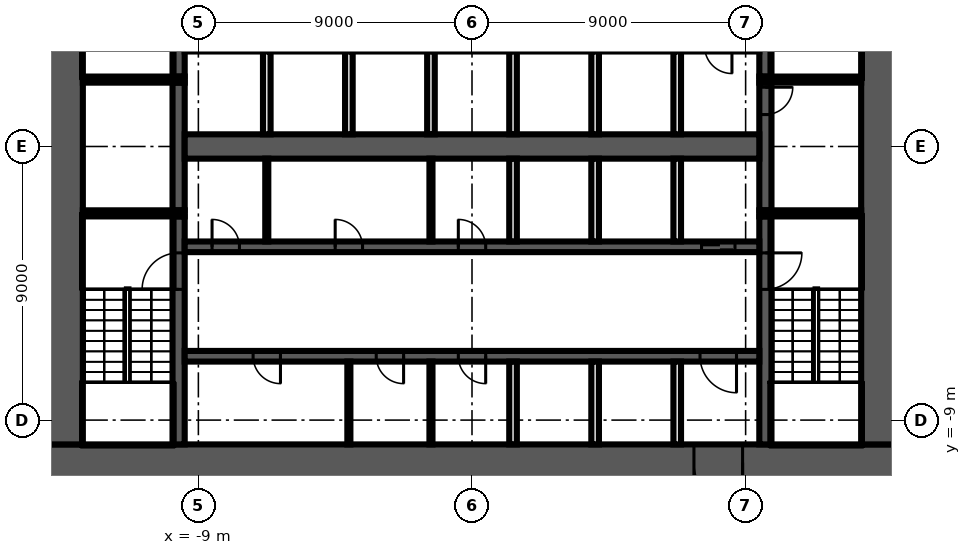
"""IFC4 building model, lengths in metres.
Left out: names, types, materials, properties, quantities, classifications, styles, units other than length and angle.
Written with IfcOpenShell. Run it as: python <this file> out.ifc"""

import sys

from ifc_helpers import new_model, si_unit, direction, frame, frame_2d, origin, place, context, subcontext, project, spatial, rectangle, extrude, element, fill, save


model = new_model("IFC4")
c1 = context("Model", 3, precision=1e-05, world=origin(), true_north=direction((0.0, 1.0)))
c2 = subcontext(c1, "Body", "Model", "MODEL_VIEW")
j1 = project(units=[si_unit("LENGTHUNIT", "METRE"), si_unit("PLANEANGLEUNIT", "RADIAN")], contexts=[c1])
p1 = place(None, origin())
s1 = spatial("IfcSite", under=j1, at=p1, CompositionType="ELEMENT")
p2 = place(p1, origin())
s2 = spatial("IfcBuilding", under=s1, at=p2, CompositionType="ELEMENT")
p3 = place(p2, frame((0.0, 0.0, 9.0)))
s3 = spatial("IfcBuildingStorey", under=s2, at=p3, CompositionType="ELEMENT", Elevation=9.0)
p4 = place(p3, frame((14.0, -10.4, 0.0), z_axis=(0.0, 0.0, 1.0), x_axis=(-1.0, 0.0, 0.0)))
e1 = element("IfcWall", 1, at=p4, inside=s3, PredefinedType="SHEAR", context=c2, shape_type="SweptSolid", body=[
    extrude(rectangle(XDim=28.0, YDim=1.2, at=frame_2d((14.0, 0.0))), origin(), (0.0, 0.0, 1.0), 9.55),
])
p5 = place(p4, frame((5.1, 0.0, 0.0)))
e2 = element("IfcOpeningElement", 2, at=p5, cuts=e1, PredefinedType="OPENING", context=c2, shape_type="SweptSolid", body=[
    extrude(rectangle(XDim=1.6, YDim=2.1, at=frame_2d((0.8, 1.05))), frame((0.0, 0.61, 0.0), z_axis=(0.0, -1.0, 0.0), x_axis=(1.0, 0.0, 0.0)), (0.0, 0.0, 1.0), 1.22),
])
for number, where, z_axis, x_axis in (
    (3, (13.4, 9.8, 0.0), (0.0, 0.0, 1.0), (0.0, -1.0, 0.0)),
    (4, (-13.4, -9.8, 0.0), (0.0, 0.0, 1.0), (0.0, 1.0, 0.0)),
):
    element("IfcWall", number, at=place(p3, frame(where, z_axis=z_axis, x_axis=x_axis)), inside=s3, PredefinedType="SHEAR", context=c2, shape_type="SweptSolid", body=[
        extrude(rectangle(XDim=19.6, YDim=1.2, at=frame_2d((9.8, 0.0))), origin(), (0.0, 0.0, 1.0), 9.55),
    ])
p6 = place(p3, frame((9.65, -2.3, 0.0), z_axis=(0.0, 0.0, 1.0), x_axis=(0.0, -1.0, 0.0)))
e5 = element("IfcWall", 5, at=p6, inside=s3, PredefinedType="SHEAR", context=c2, shape_type="SweptSolid", body=[
    extrude(rectangle(XDim=7.5, YDim=0.4, at=frame_2d((3.75, 0.0))), origin(), (0.0, 0.0, 1.0), 9.55),
])
p7 = place(p6, frame((1.2, 0.0, 0.0)))
e6 = element("IfcOpeningElement", 6, at=p7, cuts=e5, PredefinedType="OPENING", context=c2, shape_type="SweptSolid", body=[
    extrude(rectangle(XDim=1.2, YDim=2.1, at=frame_2d((0.6, 1.05))), frame((0.0, 0.21, 0.0), z_axis=(0.0, -1.0, 0.0), x_axis=(1.0, 0.0, 0.0)), (0.0, 0.0, 1.0), 0.42),
])
p8 = place(p3, frame((9.65, 2.1, 0.0), z_axis=(0.0, 0.0, 1.0), x_axis=(0.0, -1.0, 0.0)))
e7 = element("IfcWall", 7, at=p8, inside=s3, PredefinedType="SHEAR", context=c2, shape_type="SweptSolid", body=[
    extrude(rectangle(XDim=4.2, YDim=0.4, at=frame_2d((2.1, 0.0))), origin(), (0.0, 0.0, 1.0), 9.55),
])
p9 = place(p8, frame((0.15, 0.0, 0.0)))
e8 = element("IfcOpeningElement", 8, at=p9, cuts=e7, PredefinedType="OPENING", context=c2, shape_type="SweptSolid", body=[
    extrude(rectangle(XDim=0.9, YDim=2.1, at=frame_2d((0.45, 1.05))), frame((0.0, 0.21, 0.0), z_axis=(0.0, -1.0, 0.0), x_axis=(1.0, 0.0, 0.0)), (0.0, 0.0, 1.0), 0.42),
])
p10 = place(p3, frame((9.65, 9.8, 0.0), z_axis=(0.0, 0.0, 1.0), x_axis=(0.0, -1.0, 0.0)))
e9 = element("IfcWall", 9, at=p10, inside=s3, PredefinedType="SHEAR", context=c2, shape_type="SweptSolid", body=[
    extrude(rectangle(XDim=7.5, YDim=0.4, at=frame_2d((3.75, 0.0))), origin(), (0.0, 0.0, 1.0), 9.55),
])
p11 = place(p10, frame((5.1, 0.0, 0.0)))
e10 = element("IfcOpeningElement", 10, at=p11, cuts=e9, PredefinedType="OPENING", context=c2, shape_type="SweptSolid", body=[
    extrude(rectangle(XDim=1.2, YDim=2.1, at=frame_2d((0.6, 1.05))), frame((0.0, 0.21, 0.0), z_axis=(0.0, -1.0, 0.0), x_axis=(1.0, 0.0, 0.0)), (0.0, 0.0, 1.0), 0.42),
])
p12 = place(p3, frame((-9.65, -9.8, 0.0), z_axis=(0.0, 0.0, 1.0), x_axis=(0.0, 1.0, 0.0)))
e11 = element("IfcWall", 11, at=p12, inside=s3, PredefinedType="SHEAR", context=c2, shape_type="SweptSolid", body=[
    extrude(rectangle(XDim=7.5, YDim=0.4, at=frame_2d((3.75, 0.0))), origin(), (0.0, 0.0, 1.0), 9.55),
])
p13 = place(p12, frame((5.1, 0.0, 0.0)))
e12 = element("IfcOpeningElement", 12, at=p13, cuts=e11, PredefinedType="OPENING", context=c2, shape_type="SweptSolid", body=[
    extrude(rectangle(XDim=1.2, YDim=2.1, at=frame_2d((0.6, 1.05))), frame((0.0, 0.21, 0.0), z_axis=(0.0, -1.0, 0.0), x_axis=(1.0, 0.0, 0.0)), (0.0, 0.0, 1.0), 0.42),
])
p14 = place(p3, frame((-9.65, -2.1, 0.0), z_axis=(0.0, 0.0, 1.0), x_axis=(0.0, 1.0, 0.0)))
e13 = element("IfcWall", 13, at=p14, inside=s3, PredefinedType="SHEAR", context=c2, shape_type="SweptSolid", body=[
    extrude(rectangle(XDim=4.2, YDim=0.4, at=frame_2d((2.1, 0.0))), origin(), (0.0, 0.0, 1.0), 9.55),
])
p15 = place(p3, frame((-9.65, 2.3, 0.0), z_axis=(0.0, 0.0, 1.0), x_axis=(0.0, 1.0, 0.0)))
e14 = element("IfcWall", 14, at=p15, inside=s3, PredefinedType="SHEAR", context=c2, shape_type="SweptSolid", body=[
    extrude(rectangle(XDim=7.5, YDim=0.4, at=frame_2d((3.75, 0.0))), origin(), (0.0, 0.0, 1.0), 9.55),
])
p16 = place(p15, frame((1.2, 0.0, 0.0)))
e15 = element("IfcOpeningElement", 15, at=p16, cuts=e14, PredefinedType="OPENING", context=c2, shape_type="SweptSolid", body=[
    extrude(rectangle(XDim=1.2, YDim=2.1, at=frame_2d((0.6, 1.05))), frame((0.0, 0.21, 0.0), z_axis=(0.0, -1.0, 0.0), x_axis=(1.0, 0.0, 0.0)), (0.0, 0.0, 1.0), 0.42),
])
for number, where, z_axis, x_axis in (
    (16, (9.45, 2.2, 0.0), (0.0, 0.0, 1.0), (1.0, 0.0, 0.0)),
    (17, (-9.45, 2.2, 0.0), (0.0, 0.0, 1.0), (-1.0, 0.0, 0.0)),
    (18, (9.45, -2.2, 0.0), (0.0, 0.0, 1.0), (1.0, 0.0, 0.0)),
    (19, (-9.45, -2.2, 0.0), (0.0, 0.0, 1.0), (-1.0, 0.0, 0.0)),
):
    element("IfcWall", number, at=place(p3, frame(where, z_axis=z_axis, x_axis=x_axis)), inside=s3, PredefinedType="SHEAR", context=c2, shape_type="SweptSolid", body=[
        extrude(rectangle(XDim=3.35, YDim=0.2, at=frame_2d((1.675, 0.0))), origin(), (0.0, 0.0, 1.0), 9.55),
    ])
p17 = place(p3, frame((-9.45, -3.3, 0.0), z_axis=(0.0, 0.0, 1.0), x_axis=(1.0, 0.0, 0.0)))
e20 = element("IfcWall", 20, at=p17, inside=s3, PredefinedType="SHEAR", context=c2, shape_type="SweptSolid", body=[
    extrude(rectangle(XDim=18.9, YDim=0.35, at=frame_2d((9.45, 0.0))), origin(), (0.0, 0.0, 1.0), 9.55),
])
p18 = place(p17, frame((17.0, 0.0, 0.0)))
e21 = element("IfcOpeningElement", 21, at=p18, cuts=e20, PredefinedType="OPENING", context=c2, shape_type="SweptSolid", body=[
    extrude(rectangle(XDim=1.1, YDim=2.1, at=frame_2d((0.55, 1.05))), frame((0.0, 0.185, 0.0), z_axis=(0.0, -1.0, 0.0), x_axis=(1.0, 0.0, 0.0)), (0.0, 0.0, 1.0), 0.37),
])
p19 = place(p17, frame((0.9, 0.0, 0.0)))
e22 = element("IfcOpeningElement", 22, at=p19, cuts=e20, PredefinedType="OPENING", context=c2, shape_type="SweptSolid", body=[
    extrude(rectangle(XDim=0.9, YDim=2.1, at=frame_2d((0.45, 1.05))), frame((0.0, 0.185, 0.0), z_axis=(0.0, -1.0, 0.0), x_axis=(1.0, 0.0, 0.0)), (0.0, 0.0, 1.0), 0.37),
])
p20 = place(p17, frame((4.95, 0.0, 0.0)))
e23 = element("IfcOpeningElement", 23, at=p20, cuts=e20, PredefinedType="OPENING", context=c2, shape_type="SweptSolid", body=[
    extrude(rectangle(XDim=0.9, YDim=2.1, at=frame_2d((0.45, 1.05))), frame((0.0, 0.185, 0.0), z_axis=(0.0, -1.0, 0.0), x_axis=(1.0, 0.0, 0.0)), (0.0, 0.0, 1.0), 0.37),
])
p21 = place(p17, frame((9.0, 0.0, 0.0)))
e24 = element("IfcOpeningElement", 24, at=p21, cuts=e20, PredefinedType="OPENING", context=c2, shape_type="SweptSolid", body=[
    extrude(rectangle(XDim=0.9, YDim=2.1, at=frame_2d((0.45, 1.05))), frame((0.0, 0.185, 0.0), z_axis=(0.0, -1.0, 0.0), x_axis=(1.0, 0.0, 0.0)), (0.0, 0.0, 1.0), 0.37),
])
p22 = place(p3, frame((9.45, -6.9, 0.0), z_axis=(0.0, 0.0, 1.0), x_axis=(-1.0, 0.0, 0.0)))
e25 = element("IfcWall", 25, at=p22, inside=s3, PredefinedType="SHEAR", context=c2, shape_type="SweptSolid", body=[
    extrude(rectangle(XDim=18.9, YDim=0.35, at=frame_2d((9.45, 0.0))), origin(), (0.0, 0.0, 1.0), 9.55),
])
p23 = place(p22, frame((0.75, 0.0, 0.0)))
e26 = element("IfcOpeningElement", 26, at=p23, cuts=e25, PredefinedType="OPENING", context=c2, shape_type="SweptSolid", body=[
    extrude(rectangle(XDim=1.2, YDim=2.1, at=frame_2d((0.6, 1.05))), frame((0.0, 0.185, 0.0), z_axis=(0.0, -1.0, 0.0), x_axis=(1.0, 0.0, 0.0)), (0.0, 0.0, 1.0), 0.37),
])
p24 = place(p22, frame((15.75, 0.0, 0.0)))
e27 = element("IfcOpeningElement", 27, at=p24, cuts=e25, PredefinedType="OPENING", context=c2, shape_type="SweptSolid", body=[
    extrude(rectangle(XDim=0.9, YDim=2.1, at=frame_2d((0.45, 1.05))), frame((0.0, 0.185, 0.0), z_axis=(0.0, -1.0, 0.0), x_axis=(1.0, 0.0, 0.0)), (0.0, 0.0, 1.0), 0.37),
])
p25 = place(p22, frame((11.7, 0.0, 0.0)))
e28 = element("IfcOpeningElement", 28, at=p25, cuts=e25, PredefinedType="OPENING", context=c2, shape_type="SweptSolid", body=[
    extrude(rectangle(XDim=0.9, YDim=2.1, at=frame_2d((0.45, 1.05))), frame((0.0, 0.185, 0.0), z_axis=(0.0, -1.0, 0.0), x_axis=(1.0, 0.0, 0.0)), (0.0, 0.0, 1.0), 0.37),
])
p26 = place(p22, frame((9.0, 0.0, 0.0)))
e29 = element("IfcOpeningElement", 29, at=p26, cuts=e25, PredefinedType="OPENING", context=c2, shape_type="SweptSolid", body=[
    extrude(rectangle(XDim=0.9, YDim=2.1, at=frame_2d((0.45, 1.05))), frame((0.0, 0.185, 0.0), z_axis=(0.0, -1.0, 0.0), x_axis=(1.0, 0.0, 0.0)), (0.0, 0.0, 1.0), 0.37),
])
p27 = place(p3, frame((-9.45, 0.0, 0.0), z_axis=(0.0, 0.0, 1.0), x_axis=(1.0, 0.0, 0.0)))
e30 = element("IfcWall", 30, at=p27, inside=s3, PredefinedType="SHEAR", context=c2, shape_type="SweptSolid", body=[
    extrude(rectangle(XDim=18.9, YDim=0.8, at=frame_2d((9.45, 0.0))), origin(), (0.0, 0.0, 1.0), 9.55),
])
for number, where, z_axis, x_axis in (
    (31, (6.75, -9.8, 0.0), (0.0, 0.0, 1.0), (0.0, 1.0, 0.0)),
    (32, (6.75, -3.125, 0.0), (0.0, 0.0, 1.0), (0.0, 1.0, 0.0)),
    (33, (6.75, 0.4, 0.0), (0.0, 0.0, 1.0), (0.0, 1.0, 0.0)),
    (34, (4.05, -9.8, 0.0), (0.0, 0.0, 1.0), (0.0, 1.0, 0.0)),
    (35, (4.05, -3.125, 0.0), (0.0, 0.0, 1.0), (0.0, 1.0, 0.0)),
    (36, (4.05, 0.4, 0.0), (0.0, 0.0, 1.0), (0.0, 1.0, 0.0)),
    (37, (1.35, -9.8, 0.0), (0.0, 0.0, 1.0), (0.0, 1.0, 0.0)),
    (38, (1.35, -3.125, 0.0), (0.0, 0.0, 1.0), (0.0, 1.0, 0.0)),
    (39, (1.35, 0.4, 0.0), (0.0, 0.0, 1.0), (0.0, 1.0, 0.0)),
):
    element("IfcWall", number, at=place(p3, frame(where, z_axis=z_axis, x_axis=x_axis)), inside=s3, PredefinedType="SOLIDWALL", context=c2, shape_type="SweptSolid", body=[
        extrude(rectangle(XDim=2.725, YDim=0.25, at=frame_2d((1.363, 0.0))), origin(), (0.0, 0.0, 1.0), 9.55),
    ])
for number, where, z_axis, x_axis in (
    (40, (-1.35, -9.8, 0.0), (0.0, 0.0, 1.0), (0.0, 1.0, 0.0)),
    (41, (-1.35, -3.125, 0.0), (0.0, 0.0, 1.0), (0.0, 1.0, 0.0)),
):
    element("IfcWall", number, at=place(p3, frame(where, z_axis=z_axis, x_axis=x_axis)), inside=s3, PredefinedType="PARTITIONING", context=c2, shape_type="SweptSolid", body=[
        extrude(rectangle(XDim=2.725, YDim=0.1, at=frame_2d((1.363, 0.0))), origin(), (0.0, 0.0, 1.0), 9.55),
    ])
p28 = place(p3, frame((-1.35, 0.4, 0.0), z_axis=(0.0, 0.0, 1.0), x_axis=(0.0, 1.0, 0.0)))
e42 = element("IfcWall", 42, at=p28, inside=s3, PredefinedType="SOLIDWALL", context=c2, shape_type="SweptSolid", body=[
    extrude(rectangle(XDim=2.725, YDim=0.25, at=frame_2d((1.363, 0.0))), origin(), (0.0, 0.0, 1.0), 9.55),
])
p29 = place(p3, frame((-4.05, -9.8, 0.0), z_axis=(0.0, 0.0, 1.0), x_axis=(0.0, 1.0, 0.0)))
e43 = element("IfcWall", 43, at=p29, inside=s3, PredefinedType="PARTITIONING", context=c2, shape_type="SweptSolid", body=[
    extrude(rectangle(XDim=2.725, YDim=0.1, at=frame_2d((1.363, 0.0))), origin(), (0.0, 0.0, 1.0), 9.55),
])
p30 = place(p3, frame((-4.05, 0.4, 0.0), z_axis=(0.0, 0.0, 1.0), x_axis=(0.0, 1.0, 0.0)))
e44 = element("IfcWall", 44, at=p30, inside=s3, PredefinedType="SOLIDWALL", context=c2, shape_type="SweptSolid", body=[
    extrude(rectangle(XDim=2.725, YDim=0.25, at=frame_2d((1.363, 0.0))), origin(), (0.0, 0.0, 1.0), 9.55),
])
p31 = place(p3, frame((-6.75, -3.125, 0.0), z_axis=(0.0, 0.0, 1.0), x_axis=(0.0, 1.0, 0.0)))
e45 = element("IfcWall", 45, at=p31, inside=s3, PredefinedType="PARTITIONING", context=c2, shape_type="SweptSolid", body=[
    extrude(rectangle(XDim=2.725, YDim=0.1, at=frame_2d((1.363, 0.0))), origin(), (0.0, 0.0, 1.0), 9.55),
])
p32 = place(p3, frame((-6.75, 0.4, 0.0), z_axis=(0.0, 0.0, 1.0), x_axis=(0.0, 1.0, 0.0)))
e46 = element("IfcWall", 46, at=p32, inside=s3, PredefinedType="SOLIDWALL", context=c2, shape_type="SweptSolid", body=[
    extrude(rectangle(XDim=2.725, YDim=0.25, at=frame_2d((1.363, 0.0))), origin(), (0.0, 0.0, 1.0), 9.55),
])
p33 = place(p9, origin())
e47 = element("IfcDoor", 47, at=p33, inside=s3, OperationType="SINGLE_SWING_RIGHT", PredefinedType="DOOR", context=c2, shape_type="SweptSolid", body=[
    extrude(rectangle(XDim=0.9, YDim=2.1, at=frame_2d((0.45, 1.05))), frame((0.0, 0.025, 0.0), z_axis=(0.0, -1.0, 0.0), x_axis=(1.0, 0.0, 0.0)), (0.0, 0.0, 1.0), 0.05),
])
fill(e8, e47)
p34 = place(p18, origin())
e48 = element("IfcDoor", 48, at=p34, inside=s3, OperationType="DOUBLE_DOOR_SLIDING", PredefinedType="DOOR", context=c2, shape_type="SweptSolid", body=[
    extrude(rectangle(XDim=1.1, YDim=2.1, at=frame_2d((0.55, 1.05))), frame((0.0, 0.025, 0.0), z_axis=(0.0, -1.0, 0.0), x_axis=(1.0, 0.0, 0.0)), (0.0, 0.0, 1.0), 0.05),
])
fill(e21, e48)
p35 = place(p5, origin())
e49 = element("IfcDoor", 49, at=p35, inside=s3, OperationType="DOUBLE_DOOR_SINGLE_SWING", PredefinedType="DOOR", context=c2, shape_type="SweptSolid", body=[
    extrude(rectangle(XDim=1.6, YDim=2.1, at=frame_2d((0.8, 1.05))), frame((0.0, 0.025, 0.0), z_axis=(0.0, -1.0, 0.0), x_axis=(1.0, 0.0, 0.0)), (0.0, 0.0, 1.0), 0.05),
])
fill(e2, e49)
p36 = place(p23, origin())
e50 = element("IfcDoor", 50, at=p36, inside=s3, OperationType="SINGLE_SWING_LEFT", PredefinedType="DOOR", context=c2, shape_type="SweptSolid", body=[
    extrude(rectangle(XDim=1.2, YDim=2.1, at=frame_2d((0.6, 1.05))), frame((0.0, 0.025, 0.0), z_axis=(0.0, -1.0, 0.0), x_axis=(1.0, 0.0, 0.0)), (0.0, 0.0, 1.0), 0.05),
])
fill(e26, e50)
p37 = place(p19, origin())
e51 = element("IfcDoor", 51, at=p37, inside=s3, OperationType="SINGLE_SWING_RIGHT", PredefinedType="DOOR", context=c2, shape_type="SweptSolid", body=[
    extrude(rectangle(XDim=0.9, YDim=2.1, at=frame_2d((0.45, 1.05))), frame((0.0, 0.025, 0.0), z_axis=(0.0, -1.0, 0.0), x_axis=(1.0, 0.0, 0.0)), (0.0, 0.0, 1.0), 0.05),
])
fill(e22, e51)
p38 = place(p20, origin())
e52 = element("IfcDoor", 52, at=p38, inside=s3, OperationType="SINGLE_SWING_LEFT", PredefinedType="DOOR", context=c2, shape_type="SweptSolid", body=[
    extrude(rectangle(XDim=0.9, YDim=2.1, at=frame_2d((0.45, 1.05))), frame((0.0, 0.025, 0.0), z_axis=(0.0, -1.0, 0.0), x_axis=(1.0, 0.0, 0.0)), (0.0, 0.0, 1.0), 0.05),
])
fill(e23, e52)
p39 = place(p21, origin())
e53 = element("IfcDoor", 53, at=p39, inside=s3, OperationType="SINGLE_SWING_RIGHT", PredefinedType="DOOR", context=c2, shape_type="SweptSolid", body=[
    extrude(rectangle(XDim=0.9, YDim=2.1, at=frame_2d((0.45, 1.05))), frame((0.0, 0.025, 0.0), z_axis=(0.0, -1.0, 0.0), x_axis=(1.0, 0.0, 0.0)), (0.0, 0.0, 1.0), 0.05),
])
fill(e24, e53)
p40 = place(p24, origin())
e54 = element("IfcDoor", 54, at=p40, inside=s3, OperationType="SINGLE_SWING_LEFT", PredefinedType="DOOR", context=c2, shape_type="SweptSolid", body=[
    extrude(rectangle(XDim=0.9, YDim=2.1, at=frame_2d((0.45, 1.05))), frame((0.0, 0.025, 0.0), z_axis=(0.0, -1.0, 0.0), x_axis=(1.0, 0.0, 0.0)), (0.0, 0.0, 1.0), 0.05),
])
fill(e27, e54)
p41 = place(p25, origin())
e55 = element("IfcDoor", 55, at=p41, inside=s3, OperationType="SINGLE_SWING_RIGHT", PredefinedType="DOOR", context=c2, shape_type="SweptSolid", body=[
    extrude(rectangle(XDim=0.9, YDim=2.1, at=frame_2d((0.45, 1.05))), frame((0.0, 0.025, 0.0), z_axis=(0.0, -1.0, 0.0), x_axis=(1.0, 0.0, 0.0)), (0.0, 0.0, 1.0), 0.05),
])
fill(e28, e55)
p42 = place(p26, origin())
e56 = element("IfcDoor", 56, at=p42, inside=s3, OperationType="SINGLE_SWING_LEFT", PredefinedType="DOOR", context=c2, shape_type="SweptSolid", body=[
    extrude(rectangle(XDim=0.9, YDim=2.1, at=frame_2d((0.45, 1.05))), frame((0.0, 0.025, 0.0), z_axis=(0.0, -1.0, 0.0), x_axis=(1.0, 0.0, 0.0)), (0.0, 0.0, 1.0), 0.05),
])
fill(e29, e56)
p43 = place(p7, origin())
e57 = element("IfcDoor", 57, at=p43, inside=s3, OperationType="SINGLE_SWING_RIGHT", PredefinedType="DOOR", context=c2, shape_type="SweptSolid", body=[
    extrude(rectangle(XDim=1.2, YDim=2.1, at=frame_2d((0.6, 1.05))), frame((0.0, 0.025, 0.0), z_axis=(0.0, -1.0, 0.0), x_axis=(1.0, 0.0, 0.0)), (0.0, 0.0, 1.0), 0.05),
])
fill(e6, e57)
p44 = place(p13, origin())
e58 = element("IfcDoor", 58, at=p44, inside=s3, OperationType="SINGLE_SWING_LEFT", PredefinedType="DOOR", context=c2, shape_type="SweptSolid", body=[
    extrude(rectangle(XDim=1.2, YDim=2.1, at=frame_2d((0.6, 1.05))), frame((0.0, 0.025, 0.0), z_axis=(0.0, -1.0, 0.0), x_axis=(1.0, 0.0, 0.0)), (0.0, 0.0, 1.0), 0.05),
])
fill(e12, e58)
save(model, sys.argv[1])
